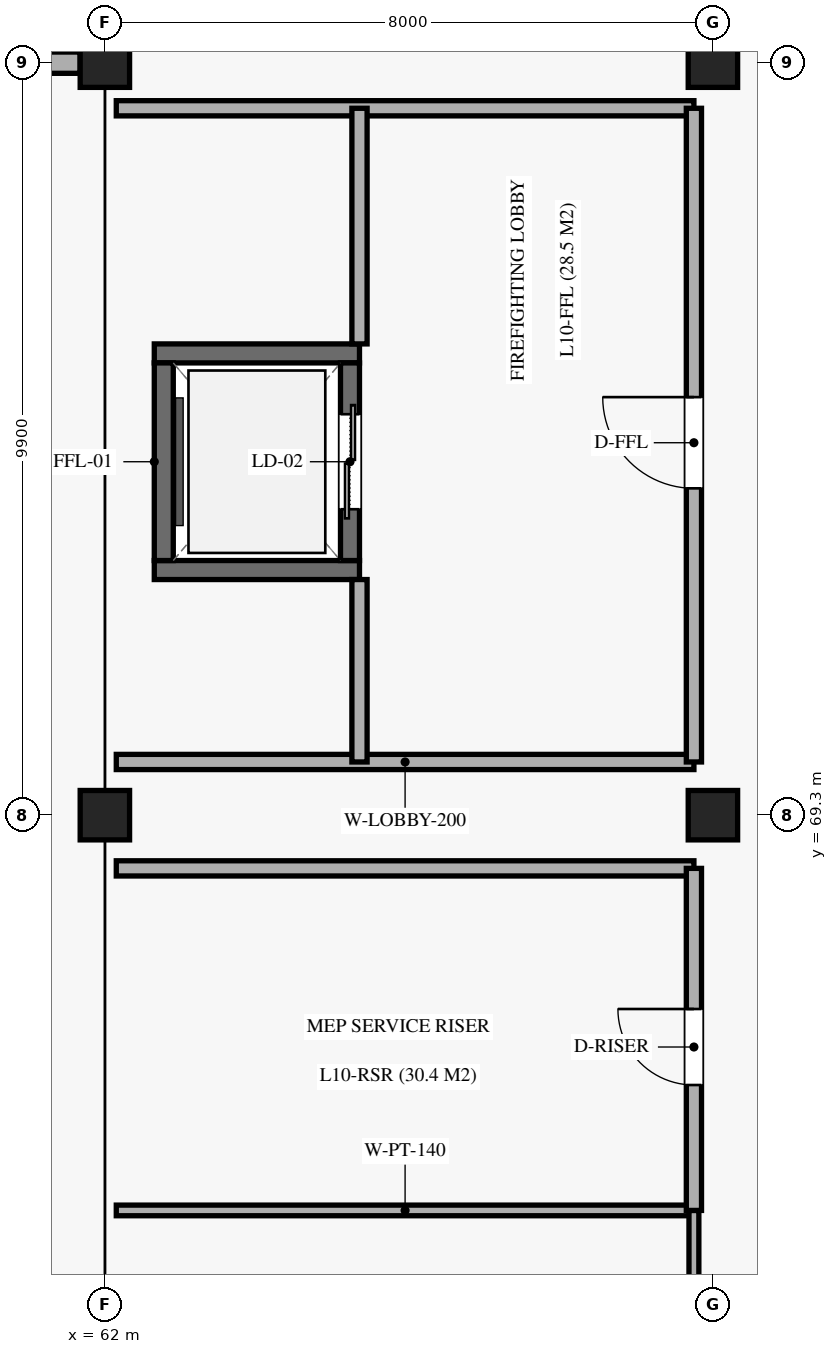
"""IFC4 building model, lengths in metres.
Left out: names, types, materials, properties, quantities, classifications, styles, units other than length and angle.
Written with IfcOpenShell. Run it as: python <this file> out.ifc"""

import sys

from ifc_helpers import new_model, si_unit, direction, frame, frame_2d, origin, origin_2d, place, context, subcontext, project, spatial, rectangle, extrude, element, fill, save


model = new_model("IFC4")
c1 = context("Model", 3, precision=1e-05, world=origin(), true_north=direction((0.0, 1.0)))
c2 = subcontext(c1, "Body", "Model", "MODEL_VIEW")
j1 = project(units=[si_unit("LENGTHUNIT", "METRE"), si_unit("PLANEANGLEUNIT", "RADIAN")], contexts=[c1])
p1 = place(None, origin())
s1 = spatial("IfcSite", under=j1, at=p1, CompositionType="ELEMENT")
p2 = place(p1, origin())
s2 = spatial("IfcBuilding", under=s1, at=p2, CompositionType="ELEMENT")
p3 = place(p2, frame((0.0, 0.0, 52.02)))
s3 = spatial("IfcBuildingStorey", under=s2, at=p3, CompositionType="ELEMENT", Elevation=52.02)
for number, where, z_axis, x_axis in (
    (1, (62.0, 69.3, 0.0), (0.0, 0.0, 1.0), (1.0, 0.0, 0.0)),
    (2, (62.0, 79.2, 0.0), (0.0, 0.0, 1.0), (1.0, 0.0, 0.0)),
    (3, (70.0, 69.3, 0.0), (0.0, 0.0, 1.0), (1.0, 0.0, 0.0)),
    (4, (70.0, 79.2, 0.0), (0.0, 0.0, 1.0), (1.0, 0.0, 0.0)),
):
    element("IfcColumn", number, at=place(p3, frame(where, z_axis=z_axis, x_axis=x_axis)), inside=s3, PredefinedType="COLUMN", context=c2, shape_type="SweptSolid", body=[
        extrude(rectangle(XDim=0.65, YDim=0.65, at=origin_2d()), origin(), (0.0, 0.0, 1.0), 5.1),
    ])
p4 = place(p3, frame((61.675, 79.2, 0.0), z_axis=(0.0, 0.0, 1.0), x_axis=(-1.0, 0.0, 0.0)))
e5 = element("IfcWall", 5, at=p4, inside=s3, PredefinedType="SOLIDWALL", context=c2, shape_type="SweptSolid", body=[
    extrude(rectangle(XDim=1.575, YDim=0.28, at=frame_2d((0.788, 0.0))), origin(), (0.0, 0.0, 1.0), 4.1),
])
for number, where, z_axis, x_axis in (
    (6, (62.65, 72.525, 0.0), (0.0, 0.0, 1.0), (1.0, 0.0, 0.0)),
    (7, (62.65, 75.375, 0.0), (0.0, 0.0, 1.0), (1.0, 0.0, 0.0)),
):
    element("IfcWall", number, at=place(p3, frame(where, z_axis=z_axis, x_axis=x_axis)), inside=s3, PredefinedType="SOLIDWALL", context=c2, shape_type="SweptSolid", body=[
        extrude(rectangle(XDim=2.7, YDim=0.25, at=frame_2d((1.35, 0.0))), origin(), (0.0, 0.0, 1.0), 4.83),
    ])
p5 = place(p3, frame((62.775, 72.65, 0.0), z_axis=(0.0, 0.0, 1.0), x_axis=(0.0, 1.0, 0.0)))
e8 = element("IfcWall", 8, at=p5, inside=s3, PredefinedType="SOLIDWALL", context=c2, shape_type="SweptSolid", body=[
    extrude(rectangle(XDim=2.6, YDim=0.25, at=frame_2d((1.3, 0.0))), origin(), (0.0, 0.0, 1.0), 4.83),
])
p6 = place(p3, frame((65.225, 72.65, 0.0), z_axis=(0.0, 0.0, 1.0), x_axis=(0.0, 1.0, 0.0)))
e9 = element("IfcWall", 9, at=p6, inside=s3, PredefinedType="SOLIDWALL", context=c2, shape_type="SweptSolid", body=[
    extrude(rectangle(XDim=2.6, YDim=0.25, at=frame_2d((1.3, 0.0))), origin(), (0.0, 0.0, 1.0), 4.83),
])
p7 = place(p6, frame((0.675, 0.0, 0.0)))
e10 = element("IfcOpeningElement", 10, at=p7, cuts=e9, PredefinedType="OPENING", context=c2, shape_type="SweptSolid", body=[
    extrude(rectangle(XDim=1.25, YDim=2.2, at=frame_2d((0.625, 1.1))), frame((0.0, 0.135, 0.0), z_axis=(0.0, -1.0, 0.0), x_axis=(1.0, 0.0, 0.0)), (0.0, 0.0, 1.0), 0.27),
])
for number, where, z_axis, x_axis in (
    (11, (62.15, 70.0, 0.0), (0.0, 0.0, 1.0), (1.0, 0.0, 0.0)),
    (12, (62.15, 78.6, 0.0), (0.0, 0.0, 1.0), (1.0, 0.0, 0.0)),
):
    element("IfcWall", number, at=place(p3, frame(where, z_axis=z_axis, x_axis=x_axis)), inside=s3, PredefinedType="SOLIDWALL", context=c2, shape_type="SweptSolid", body=[
        extrude(rectangle(XDim=7.6, YDim=0.2, at=frame_2d((3.8, 0.0))), origin(), (0.0, 0.0, 1.0), 3.97),
    ])
p8 = place(p3, frame((65.35, 70.0, 0.0), z_axis=(0.0, 0.0, 1.0), x_axis=(0.0, 1.0, 0.0)))
e13 = element("IfcWall", 13, at=p8, inside=s3, PredefinedType="SOLIDWALL", context=c2, shape_type="SweptSolid", body=[
    extrude(rectangle(XDim=2.4, YDim=0.2, at=frame_2d((1.2, 0.0))), origin(), (0.0, 0.0, 1.0), 3.97),
])
p9 = place(p3, frame((65.35, 75.5, 0.0), z_axis=(0.0, 0.0, 1.0), x_axis=(0.0, 1.0, 0.0)))
e14 = element("IfcWall", 14, at=p9, inside=s3, PredefinedType="SOLIDWALL", context=c2, shape_type="SweptSolid", body=[
    extrude(rectangle(XDim=3.1, YDim=0.2, at=frame_2d((1.55, 0.0))), origin(), (0.0, 0.0, 1.0), 3.97),
])
p10 = place(p3, frame((69.75, 70.0, 0.0), z_axis=(0.0, 0.0, 1.0), x_axis=(0.0, 1.0, 0.0)))
e15 = element("IfcWall", 15, at=p10, inside=s3, PredefinedType="SOLIDWALL", context=c2, shape_type="SweptSolid", body=[
    extrude(rectangle(XDim=8.6, YDim=0.2, at=frame_2d((4.3, 0.0))), origin(), (0.0, 0.0, 1.0), 3.97),
])
p11 = place(p10, frame((3.6, 0.0, 0.0)))
e16 = element("IfcOpeningElement", 16, at=p11, cuts=e15, PredefinedType="OPENING", context=c2, shape_type="SweptSolid", body=[
    extrude(rectangle(XDim=1.2, YDim=2.25, at=frame_2d((0.6, 1.125))), frame((0.0, 0.11, 0.0), z_axis=(0.0, -1.0, 0.0), x_axis=(1.0, 0.0, 0.0)), (0.0, 0.0, 1.0), 0.22),
])
p12 = place(p3, frame((62.15, 64.1, 0.0), z_axis=(0.0, 0.0, 1.0), x_axis=(1.0, 0.0, 0.0)))
e17 = element("IfcWall", 17, at=p12, inside=s3, PredefinedType="PARTITIONING", context=c2, shape_type="SweptSolid", body=[
    extrude(rectangle(XDim=7.6, YDim=0.14, at=frame_2d((3.8, 0.0))), origin(), (0.0, 0.0, 1.0), 3.97),
])
p13 = place(p3, frame((69.75, 59.9, 0.0), z_axis=(0.0, 0.0, 1.0), x_axis=(0.0, 1.0, 0.0)))
e18 = element("IfcWall", 18, at=p13, inside=s3, PredefinedType="PARTITIONING", context=c2, shape_type="SweptSolid", body=[
    extrude(rectangle(XDim=4.2, YDim=0.13, at=frame_2d((2.1, 0.0))), origin(), (0.0, 0.0, 1.0), 3.97),
])
p14 = place(p13, frame((1.5, 0.0, 0.0)))
e19 = element("IfcOpeningElement", 19, at=p14, cuts=e18, PredefinedType="OPENING", context=c2, shape_type="SweptSolid", body=[
    extrude(rectangle(XDim=0.95, YDim=2.1, at=frame_2d((0.475, 1.05))), frame((0.0, 0.075, 0.0), z_axis=(0.0, -1.0, 0.0), x_axis=(1.0, 0.0, 0.0)), (0.0, 0.0, 1.0), 0.15),
])
p15 = place(p3, frame((62.15, 68.6, 0.0), z_axis=(0.0, 0.0, 1.0), x_axis=(1.0, 0.0, 0.0)))
e20 = element("IfcWall", 20, at=p15, inside=s3, PredefinedType="SOLIDWALL", context=c2, shape_type="SweptSolid", body=[
    extrude(rectangle(XDim=7.6, YDim=0.2, at=frame_2d((3.8, 0.0))), origin(), (0.0, 0.0, 1.0), 3.97),
])
p16 = place(p3, frame((69.75, 64.1, 0.0), z_axis=(0.0, 0.0, 1.0), x_axis=(0.0, 1.0, 0.0)))
e21 = element("IfcWall", 21, at=p16, inside=s3, PredefinedType="SOLIDWALL", context=c2, shape_type="SweptSolid", body=[
    extrude(rectangle(XDim=4.5, YDim=0.2, at=frame_2d((2.25, 0.0))), origin(), (0.0, 0.0, 1.0), 3.97),
])
p17 = place(p16, frame((1.65, 0.0, 0.0)))
e22 = element("IfcOpeningElement", 22, at=p17, cuts=e21, PredefinedType="OPENING", context=c2, shape_type="SweptSolid", body=[
    extrude(rectangle(XDim=1.0, YDim=2.15, at=frame_2d((0.5, 1.075))), frame((0.0, 0.11, 0.0), z_axis=(0.0, -1.0, 0.0), x_axis=(1.0, 0.0, 0.0)), (0.0, 0.0, 1.0), 0.22),
])
p18 = place(p7, origin())
e23 = element("IfcDoor", 23, at=p18, inside=s3, OperationType="DOUBLE_DOOR_SLIDING", PredefinedType="DOOR", context=c2, shape_type="SweptSolid", body=[
    extrude(rectangle(XDim=1.25, YDim=2.2, at=frame_2d((0.625, 1.1))), frame((0.0, 0.025, 0.0), z_axis=(0.0, -1.0, 0.0), x_axis=(1.0, 0.0, 0.0)), (0.0, 0.0, 1.0), 0.05),
])
fill(e10, e23)
p19 = place(p11, origin())
e24 = element("IfcDoor", 24, at=p19, inside=s3, OperationType="SINGLE_SWING_RIGHT", PredefinedType="DOOR", context=c2, shape_type="SweptSolid", body=[
    extrude(rectangle(XDim=1.2, YDim=2.25, at=frame_2d((0.6, 1.125))), frame((0.0, 0.025, 0.0), z_axis=(0.0, -1.0, 0.0), x_axis=(1.0, 0.0, 0.0)), (0.0, 0.0, 1.0), 0.05),
])
fill(e16, e24)
p20 = place(p17, origin())
e25 = element("IfcDoor", 25, at=p20, inside=s3, OperationType="SINGLE_SWING_RIGHT", PredefinedType="DOOR", context=c2, shape_type="SweptSolid", body=[
    extrude(rectangle(XDim=1.0, YDim=2.15, at=frame_2d((0.5, 1.075))), frame((0.0, 0.025, 0.0), z_axis=(0.0, -1.0, 0.0), x_axis=(1.0, 0.0, 0.0)), (0.0, 0.0, 1.0), 0.05),
])
fill(e22, e25)
save(model, sys.argv[1])
